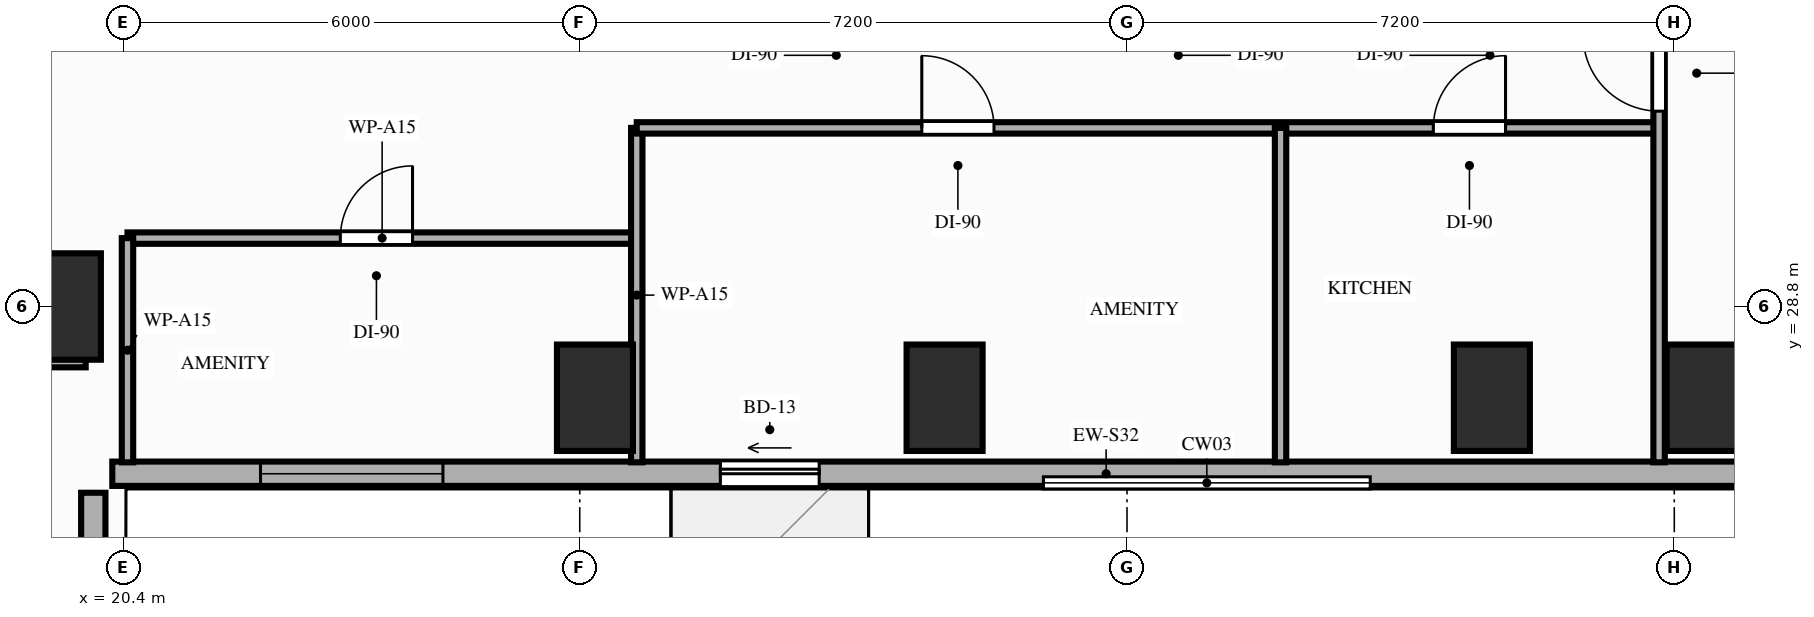
"""IFC4 building model, lengths in metres.
Left out: names, types, materials, properties, quantities, classifications, styles, units other than length and angle.
Written with IfcOpenShell. Run it as: python <this file> out.ifc"""

import sys

from ifc_helpers import new_model, si_unit, direction, frame, frame_2d, origin, origin_2d, place, context, subcontext, project, spatial, rectangle, extrude, element, fill, save


model = new_model("IFC4")
c1 = context("Model", 3, precision=1e-05, world=origin(), true_north=direction((0.0, 1.0)))
c2 = subcontext(c1, "Body", "Model", "MODEL_VIEW")
j1 = project(units=[si_unit("LENGTHUNIT", "METRE"), si_unit("PLANEANGLEUNIT", "RADIAN")], contexts=[c1])
p1 = place(None, origin())
s1 = spatial("IfcSite", under=j1, at=p1, CompositionType="ELEMENT")
p2 = place(p1, origin())
s2 = spatial("IfcBuilding", under=s1, at=p2, CompositionType="ELEMENT")
p3 = place(p2, frame((0.0, 0.0, 62.8)))
s3 = spatial("IfcBuildingStorey", under=s2, at=p3, CompositionType="ELEMENT", Elevation=62.8)
for number, where, z_axis, x_axis in (
    (1, (19.6, 28.8, 0.0), (0.0, 0.0, 1.0), (1.0, 0.0, 0.0)),
    (2, (26.6, 27.6, 0.0), (0.0, 0.0, 1.0), (1.0, 0.0, 0.0)),
    (3, (31.2, 27.6, 0.0), (0.0, 0.0, 1.0), (1.0, 0.0, 0.0)),
    (4, (38.4, 27.6, 0.0), (0.0, 0.0, 1.0), (1.0, 0.0, 0.0)),
    (5, (41.2, 27.6, 0.0), (0.0, 0.0, 1.0), (1.0, 0.0, 0.0)),
):
    element("IfcColumn", number, at=place(p3, frame(where, z_axis=z_axis, x_axis=x_axis)), inside=s3, PredefinedType="COLUMN", context=c2, shape_type="SweptSolid", body=[
        extrude(rectangle(XDim=1.0, YDim=1.4, at=origin_2d()), origin(), (0.0, 0.0, 1.0), 3.2),
    ])
p4 = place(p3, frame((20.0, 8.8, 0.0), z_axis=(0.0, 0.0, 1.0), x_axis=(0.0, 1.0, 0.0)))
e6 = element("IfcWall", 6, at=p4, inside=s3, PredefinedType="STANDARD", context=c2, shape_type="SweptSolid", body=[
    extrude(rectangle(XDim=17.55, YDim=0.32, at=frame_2d((8.775, 0.0))), origin(), (0.0, 0.0, 1.0), 2.4),
])
p5 = place(p4, frame((5.15, 0.0, 0.85)))
e7 = element("IfcOpeningElement", 7, at=p5, cuts=e6, PredefinedType="OPENING", context=c2, shape_type="SweptSolid", body=[
    extrude(rectangle(XDim=2.4, YDim=1.3, at=frame_2d((1.2, 0.65))), frame((0.0, 0.17, 0.0), z_axis=(0.0, -1.0, 0.0), x_axis=(1.0, 0.0, 0.0)), (0.0, 0.0, 1.0), 0.34),
])
p6 = place(p4, frame((11.25, 0.0, 0.85)))
e8 = element("IfcOpeningElement", 8, at=p6, cuts=e6, PredefinedType="OPENING", context=c2, shape_type="SweptSolid", body=[
    extrude(rectangle(XDim=2.4, YDim=1.3, at=frame_2d((1.2, 0.65))), frame((0.0, 0.17, 0.0), z_axis=(0.0, -1.0, 0.0), x_axis=(1.0, 0.0, 0.0)), (0.0, 0.0, 1.0), 0.34),
])
p7 = place(p3, frame((20.25, 26.6, 0.0), z_axis=(0.0, 0.0, 1.0), x_axis=(1.0, 0.0, 0.0)))
e9 = element("IfcWall", 9, at=p7, inside=s3, PredefinedType="STANDARD", context=c2, shape_type="SweptSolid", body=[
    extrude(rectangle(XDim=26.15, YDim=0.32, at=frame_2d((13.075, 0.0))), origin(), (0.0, 0.0, 1.0), 3.02),
])
p8 = place(p7, frame((8.0, 0.0, 0.0)))
e10 = element("IfcOpeningElement", 10, at=p8, cuts=e9, PredefinedType="OPENING", context=c2, shape_type="SweptSolid", body=[
    extrude(rectangle(XDim=1.3, YDim=2.08, at=frame_2d((0.65, 1.04))), frame((0.0, 0.17, 0.0), z_axis=(0.0, -1.0, 0.0), x_axis=(1.0, 0.0, 0.0)), (0.0, 0.0, 1.0), 0.34),
])
p9 = place(p7, frame((22.5, 0.0, 0.0)))
e11 = element("IfcOpeningElement", 11, at=p9, cuts=e9, PredefinedType="OPENING", context=c2, shape_type="SweptSolid", body=[
    extrude(rectangle(XDim=1.3, YDim=2.08, at=frame_2d((0.65, 1.04))), frame((0.0, 0.17, 0.0), z_axis=(0.0, -1.0, 0.0), x_axis=(1.0, 0.0, 0.0)), (0.0, 0.0, 1.0), 0.34),
])
p10 = place(p7, frame((1.95, 0.0, 0.85)))
e12 = element("IfcOpeningElement", 12, at=p10, cuts=e9, PredefinedType="OPENING", context=c2, shape_type="SweptSolid", body=[
    extrude(rectangle(XDim=2.4, YDim=1.8, at=frame_2d((1.2, 0.9))), frame((0.0, 0.17, 0.0), z_axis=(0.0, -1.0, 0.0), x_axis=(1.0, 0.0, 0.0)), (0.0, 0.0, 1.0), 0.34),
])
p11 = place(p3, frame((11.01, 28.1, 0.0), z_axis=(0.0, 0.0, 1.0), x_axis=(1.0, 0.0, 0.0)))
e13 = element("IfcWall", 13, at=p11, inside=s3, PredefinedType="PARTITIONING", context=c2, shape_type="SweptSolid", body=[
    extrude(rectangle(XDim=8.89, YDim=0.2, at=frame_2d((4.445, 0.0))), origin(), (0.0, 0.0, 1.0), 2.4),
])
p12 = place(p3, frame((20.45, 29.7, 0.0), z_axis=(0.0, 0.0, 1.0), x_axis=(1.0, 0.0, 0.0)))
e14 = element("IfcWall", 14, at=p12, inside=s3, PredefinedType="PARTITIONING", context=c2, shape_type="SweptSolid", body=[
    extrude(rectangle(XDim=6.7, YDim=0.15, at=frame_2d((3.35, 0.0))), origin(), (0.0, 0.0, 1.0), 3.02),
])
p13 = place(p12, frame((2.8, 0.0, 0.0)))
e15 = element("IfcOpeningElement", 15, at=p13, cuts=e14, PredefinedType="OPENING", context=c2, shape_type="SweptSolid", body=[
    extrude(rectangle(XDim=0.95, YDim=2.15, at=frame_2d((0.475, 1.075))), frame((0.0, 0.085, 0.0), z_axis=(0.0, -1.0, 0.0), x_axis=(1.0, 0.0, 0.0)), (0.0, 0.0, 1.0), 0.17),
])
p14 = place(p3, frame((20.45, 26.75, 0.0), z_axis=(0.0, 0.0, 1.0), x_axis=(0.0, 1.0, 0.0)))
e16 = element("IfcWall", 16, at=p14, inside=s3, PredefinedType="PARTITIONING", context=c2, shape_type="SweptSolid", body=[
    extrude(rectangle(XDim=2.95, YDim=0.15, at=frame_2d((1.475, 0.0))), origin(), (0.0, 0.0, 1.0), 2.4),
])
p15 = place(p3, frame((27.15, 26.75, 0.0), z_axis=(0.0, 0.0, 1.0), x_axis=(0.0, 1.0, 0.0)))
e17 = element("IfcWall", 17, at=p15, inside=s3, PredefinedType="PARTITIONING", context=c2, shape_type="SweptSolid", body=[
    extrude(rectangle(XDim=4.4, YDim=0.15, at=frame_2d((2.2, 0.0))), origin(), (0.0, 0.0, 1.0), 2.4),
])
p16 = place(p3, frame((27.15, 31.15, 0.0), z_axis=(0.0, 0.0, 1.0), x_axis=(1.0, 0.0, 0.0)))
e18 = element("IfcWall", 18, at=p16, inside=s3, PredefinedType="PARTITIONING", context=c2, shape_type="SweptSolid", body=[
    extrude(rectangle(XDim=13.45, YDim=0.15, at=frame_2d((6.725, 0.0))), origin(), (0.0, 0.0, 1.0), 2.4),
])
p17 = place(p16, frame((3.75, 0.0, 0.0)))
e19 = element("IfcOpeningElement", 19, at=p17, cuts=e18, PredefinedType="OPENING", context=c2, shape_type="SweptSolid", body=[
    extrude(rectangle(XDim=0.95, YDim=2.15, at=frame_2d((0.475, 1.075))), frame((0.0, 0.085, 0.0), z_axis=(0.0, -1.0, 0.0), x_axis=(1.0, 0.0, 0.0)), (0.0, 0.0, 1.0), 0.17),
])
p18 = place(p16, frame((10.48, 0.0, 0.0)))
e20 = element("IfcOpeningElement", 20, at=p18, cuts=e18, PredefinedType="OPENING", context=c2, shape_type="SweptSolid", body=[
    extrude(rectangle(XDim=0.95, YDim=2.15, at=frame_2d((0.475, 1.075))), frame((0.0, 0.085, 0.0), z_axis=(0.0, -1.0, 0.0), x_axis=(1.0, 0.0, 0.0)), (0.0, 0.0, 1.0), 0.17),
])
p19 = place(p3, frame((40.6, 26.75, 0.0), z_axis=(0.0, 0.0, 1.0), x_axis=(0.0, 1.0, 0.0)))
e21 = element("IfcWall", 21, at=p19, inside=s3, PredefinedType="PARTITIONING", context=c2, shape_type="SweptSolid", body=[
    extrude(rectangle(XDim=15.45, YDim=0.15, at=frame_2d((7.725, 0.0))), origin(), (0.0, 0.0, 1.0), 2.4),
])
p20 = place(p19, frame((4.62, 0.0, 0.0)))
e22 = element("IfcOpeningElement", 22, at=p20, cuts=e21, PredefinedType="OPENING", context=c2, shape_type="SweptSolid", body=[
    extrude(rectangle(XDim=1.0, YDim=2.15, at=frame_2d((0.5, 1.075))), frame((0.0, 0.085, 0.0), z_axis=(0.0, -1.0, 0.0), x_axis=(1.0, 0.0, 0.0)), (0.0, 0.0, 1.0), 0.17),
])
p21 = place(p3, frame((35.62, 26.75, 0.0), z_axis=(0.0, 0.0, 1.0), x_axis=(0.0, 1.0, 0.0)))
e23 = element("IfcWall", 23, at=p21, inside=s3, PredefinedType="PARTITIONING", context=c2, shape_type="SweptSolid", body=[
    extrude(rectangle(XDim=4.4, YDim=0.15, at=frame_2d((2.2, 0.0))), origin(), (0.0, 0.0, 1.0), 2.4),
])
p22 = place(p8, origin())
e24 = element("IfcDoor", 24, at=p22, inside=s3, OperationType="SLIDING_TO_LEFT", PredefinedType="DOOR", context=c2, shape_type="SweptSolid", body=[
    extrude(rectangle(XDim=1.3, YDim=2.08, at=frame_2d((0.65, 1.04))), frame((0.0, 0.025, 0.0), z_axis=(0.0, -1.0, 0.0), x_axis=(1.0, 0.0, 0.0)), (0.0, 0.0, 1.0), 0.05),
])
fill(e10, e24)
p23 = place(p10, origin())
e25 = element("IfcWindow", 25, at=p23, inside=s3, PartitioningType="SINGLE_PANEL", PredefinedType="WINDOW", context=c2, shape_type="SweptSolid", body=[
    extrude(rectangle(XDim=2.4, YDim=1.8, at=frame_2d((1.2, 0.9))), frame((0.0, 0.03, 0.0), z_axis=(0.0, -1.0, 0.0), x_axis=(1.0, 0.0, 0.0)), (0.0, 0.0, 1.0), 0.06),
])
fill(e12, e25)
p24 = place(p13, origin())
e26 = element("IfcDoor", 26, at=p24, inside=s3, OperationType="SINGLE_SWING_RIGHT", PredefinedType="DOOR", context=c2, shape_type="SweptSolid", body=[
    extrude(rectangle(XDim=0.95, YDim=2.15, at=frame_2d((0.475, 1.075))), frame((0.0, 0.025, 0.0), z_axis=(0.0, -1.0, 0.0), x_axis=(1.0, 0.0, 0.0)), (0.0, 0.0, 1.0), 0.05),
])
fill(e15, e26)
p25 = place(p20, origin())
e27 = element("IfcDoor", 27, at=p25, inside=s3, OperationType="SINGLE_SWING_RIGHT", PredefinedType="DOOR", context=c2, shape_type="SweptSolid", body=[
    extrude(rectangle(XDim=1.0, YDim=2.15, at=frame_2d((0.5, 1.075))), frame((0.0, 0.025, 0.0), z_axis=(0.0, -1.0, 0.0), x_axis=(1.0, 0.0, 0.0)), (0.0, 0.0, 1.0), 0.05),
])
fill(e22, e27)
p26 = place(p17, origin())
e28 = element("IfcDoor", 28, at=p26, inside=s3, OperationType="SINGLE_SWING_LEFT", PredefinedType="DOOR", context=c2, shape_type="SweptSolid", body=[
    extrude(rectangle(XDim=0.95, YDim=2.15, at=frame_2d((0.475, 1.075))), frame((0.0, 0.025, 0.0), z_axis=(0.0, -1.0, 0.0), x_axis=(1.0, 0.0, 0.0)), (0.0, 0.0, 1.0), 0.05),
])
fill(e19, e28)
p27 = place(p18, origin())
e29 = element("IfcDoor", 29, at=p27, inside=s3, OperationType="SINGLE_SWING_RIGHT", PredefinedType="DOOR", context=c2, shape_type="SweptSolid", body=[
    extrude(rectangle(XDim=0.95, YDim=2.15, at=frame_2d((0.475, 1.075))), frame((0.0, 0.025, 0.0), z_axis=(0.0, -1.0, 0.0), x_axis=(1.0, 0.0, 0.0)), (0.0, 0.0, 1.0), 0.05),
])
fill(e20, e29)
save(model, sys.argv[1])
